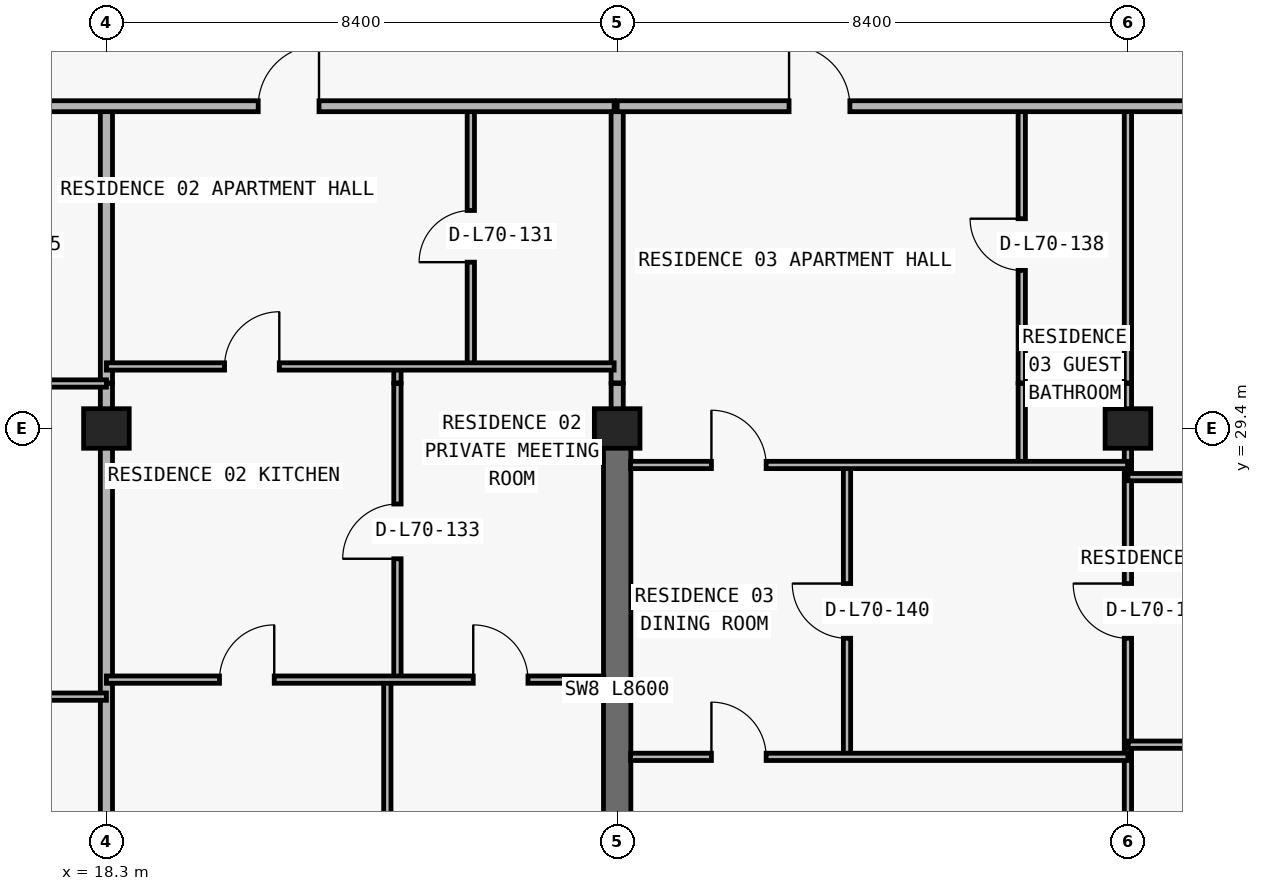
"""IFC4 building model, lengths in metres.
Left out: names, types, materials, properties, quantities, classifications, styles, units other than length and angle.
Written with IfcOpenShell. Run it as: python <this file> out.ifc"""

import sys

from ifc_helpers import new_model, si_unit, direction, frame, frame_2d, origin, origin_2d, place, context, subcontext, project, spatial, rectangle, extrude, element, fill, save


model = new_model("IFC4")
c1 = context("Model", 3, precision=1e-05, world=origin(), true_north=direction((0.0, 1.0)))
c2 = subcontext(c1, "Body", "Model", "MODEL_VIEW")
j1 = project(units=[si_unit("LENGTHUNIT", "METRE"), si_unit("PLANEANGLEUNIT", "RADIAN")], contexts=[c1])
p1 = place(None, origin())
s1 = spatial("IfcSite", under=j1, at=p1, CompositionType="ELEMENT")
p2 = place(p1, origin())
s2 = spatial("IfcBuilding", under=s1, at=p2, CompositionType="ELEMENT")
p3 = place(p2, frame((0.0, 0.0, 249.6)))
s3 = spatial("IfcBuildingStorey", under=s2, at=p3, CompositionType="ELEMENT", Elevation=249.6)
for number, where, z_axis, x_axis in (
    (1, (18.3, 29.4, 0.0), (0.0, 0.0, 1.0), (1.0, 0.0, 0.0)),
    (2, (26.7, 29.4, 0.0), (0.0, 0.0, 1.0), (1.0, 0.0, 0.0)),
    (3, (35.1, 29.4, 0.0), (0.0, 0.0, 1.0), (1.0, 0.0, 0.0)),
):
    element("IfcColumn", number, at=place(p3, frame(where, z_axis=z_axis, x_axis=x_axis)), inside=s3, PredefinedType="COLUMN", context=c2, shape_type="SweptSolid", body=[
        extrude(rectangle(XDim=0.75, YDim=0.65, at=origin_2d()), origin(), (0.0, 0.0, 1.0), 3.05),
    ])
p4 = place(p3, frame((26.7, 20.8, 0.0), z_axis=(0.0, 0.0, 1.0), x_axis=(0.0, 1.0, 0.0)))
e4 = element("IfcWall", 4, at=p4, inside=s3, PredefinedType="SHEAR", context=c2, shape_type="SweptSolid", body=[
    extrude(rectangle(XDim=8.6, YDim=0.45, at=frame_2d((4.3, 0.0))), origin(), (0.0, 0.0, 1.0), 3.05),
])
p5 = place(p3, frame((18.3, 13.34, 0.0), z_axis=(0.0, 0.0, 1.0), x_axis=(0.0, 1.0, 0.0)))
e5 = element("IfcWall", 5, at=p5, inside=s3, PredefinedType="PARTITIONING", context=c2, shape_type="SweptSolid", body=[
    extrude(rectangle(XDim=16.8, YDim=0.2, at=frame_2d((8.4, 0.0))), origin(), (0.0, 0.0, 1.0), 2.263),
])
p6 = place(p3, frame((18.3, 30.15, 0.0), z_axis=(0.0, 0.0, 1.0), x_axis=(0.0, 1.0, 0.0)))
e6 = element("IfcWall", 6, at=p6, inside=s3, PredefinedType="PARTITIONING", context=c2, shape_type="SweptSolid", body=[
    extrude(rectangle(XDim=4.55, YDim=0.2, at=frame_2d((2.275, 0.0))), origin(), (0.0, 0.0, 1.0), 2.263),
])
p7 = place(p3, frame((22.92, 13.34, 0.0), z_axis=(0.0, 0.0, 1.0), x_axis=(0.0, 1.0, 0.0)))
e7 = element("IfcWall", 7, at=p7, inside=s3, PredefinedType="PARTITIONING", context=c2, shape_type="SweptSolid", body=[
    extrude(rectangle(XDim=11.93, YDim=0.12, at=frame_2d((5.965, 0.0))), origin(), (0.0, 0.0, 1.0), 3.05),
])
p8 = place(p3, frame((23.086, 25.275, 0.0), z_axis=(0.0, 0.0, 1.0), x_axis=(0.0, 1.0, 0.0)))
e8 = element("IfcWall", 8, at=p8, inside=s3, PredefinedType="PARTITIONING", context=c2, shape_type="SweptSolid", body=[
    extrude(rectangle(XDim=4.865, YDim=0.12, at=frame_2d((2.433, 0.0))), origin(), (0.0, 0.0, 1.0), 3.05),
])
p9 = place(p8, frame((1.982, 0.0, 0.0)))
e9 = element("IfcOpeningElement", 9, at=p9, cuts=e8, PredefinedType="OPENING", context=c2, shape_type="SweptSolid", body=[
    extrude(rectangle(XDim=0.9, YDim=2.15, at=frame_2d((0.45, 1.075))), frame((0.0, 0.07, 0.0), z_axis=(0.0, -1.0, 0.0), x_axis=(1.0, 0.0, 0.0)), (0.0, 0.0, 1.0), 0.14),
])
p10 = place(p3, frame((23.086, 30.15, 0.0), z_axis=(0.0, 0.0, 1.0), x_axis=(0.0, 1.0, 0.0)))
e10 = element("IfcWall", 10, at=p10, inside=s3, PredefinedType="PARTITIONING", context=c2, shape_type="SweptSolid", body=[
    extrude(rectangle(XDim=0.27, YDim=0.12, at=frame_2d((0.135, 0.0))), origin(), (0.0, 0.0, 1.0), 3.05),
])
p11 = place(p3, frame((24.293, 30.42, 0.0), z_axis=(0.0, 0.0, 1.0), x_axis=(0.0, 1.0, 0.0)))
e11 = element("IfcWall", 11, at=p11, inside=s3, PredefinedType="PARTITIONING", context=c2, shape_type="SweptSolid", body=[
    extrude(rectangle(XDim=4.28, YDim=0.12, at=frame_2d((2.14, 0.0))), origin(), (0.0, 0.0, 1.0), 3.05),
])
p12 = place(p11, frame((1.715, 0.0, 0.0)))
e12 = element("IfcOpeningElement", 12, at=p12, cuts=e11, PredefinedType="OPENING", context=c2, shape_type="SweptSolid", body=[
    extrude(rectangle(XDim=0.85, YDim=2.1, at=frame_2d((0.425, 1.05))), frame((0.0, 0.07, 0.0), z_axis=(0.0, -1.0, 0.0), x_axis=(1.0, 0.0, 0.0)), (0.0, 0.0, 1.0), 0.14),
])
p13 = place(p3, frame((26.7, 29.405, 0.0), z_axis=(0.0, 0.0, 1.0), x_axis=(0.0, 1.0, 0.0)))
e13 = element("IfcWall", 13, at=p13, inside=s3, PredefinedType="PARTITIONING", context=c2, shape_type="SweptSolid", body=[
    extrude(rectangle(XDim=0.735, YDim=0.2, at=frame_2d((0.367, 0.0))), origin(), (0.0, 0.0, 1.0), 2.335),
])
p14 = place(p3, frame((26.7, 30.15, 0.0), z_axis=(0.0, 0.0, 1.0), x_axis=(0.0, 1.0, 0.0)))
e14 = element("IfcWall", 14, at=p14, inside=s3, PredefinedType="PARTITIONING", context=c2, shape_type="SweptSolid", body=[
    extrude(rectangle(XDim=4.55, YDim=0.2, at=frame_2d((2.275, 0.0))), origin(), (0.0, 0.0, 1.0), 2.335),
])
p15 = place(p3, frame((30.48, 24.0, 0.0), z_axis=(0.0, 0.0, 1.0), x_axis=(0.0, 1.0, 0.0)))
e15 = element("IfcWall", 15, at=p15, inside=s3, PredefinedType="PARTITIONING", context=c2, shape_type="SweptSolid", body=[
    extrude(rectangle(XDim=4.8, YDim=0.12, at=frame_2d((2.4, 0.0))), origin(), (0.0, 0.0, 1.0), 3.05),
])
p16 = place(p15, frame((1.95, 0.0, 0.0)))
e16 = element("IfcOpeningElement", 16, at=p16, cuts=e15, PredefinedType="OPENING", context=c2, shape_type="SweptSolid", body=[
    extrude(rectangle(XDim=0.9, YDim=2.15, at=frame_2d((0.45, 1.075))), frame((0.0, 0.07, 0.0), z_axis=(0.0, -1.0, 0.0), x_axis=(1.0, 0.0, 0.0)), (0.0, 0.0, 1.0), 0.14),
])
p17 = place(p3, frame((33.354, 28.8, 0.0), z_axis=(0.0, 0.0, 1.0), x_axis=(0.0, 1.0, 0.0)))
e17 = element("IfcWall", 17, at=p17, inside=s3, PredefinedType="PARTITIONING", context=c2, shape_type="SweptSolid", body=[
    extrude(rectangle(XDim=1.34, YDim=0.12, at=frame_2d((0.67, 0.0))), origin(), (0.0, 0.0, 1.0), 3.05),
])
p18 = place(p3, frame((33.354, 30.15, 0.0), z_axis=(0.0, 0.0, 1.0), x_axis=(0.0, 1.0, 0.0)))
e18 = element("IfcWall", 18, at=p18, inside=s3, PredefinedType="PARTITIONING", context=c2, shape_type="SweptSolid", body=[
    extrude(rectangle(XDim=4.55, YDim=0.12, at=frame_2d((2.275, 0.0))), origin(), (0.0, 0.0, 1.0), 3.05),
])
p19 = place(p18, frame((1.85, 0.0, 0.0)))
e19 = element("IfcOpeningElement", 19, at=p19, cuts=e18, PredefinedType="OPENING", context=c2, shape_type="SweptSolid", body=[
    extrude(rectangle(XDim=0.85, YDim=2.1, at=frame_2d((0.425, 1.05))), frame((0.0, 0.07, 0.0), z_axis=(0.0, -1.0, 0.0), x_axis=(1.0, 0.0, 0.0)), (0.0, 0.0, 1.0), 0.14),
])
p20 = place(p3, frame((35.1, 13.34, 0.0), z_axis=(0.0, 0.0, 1.0), x_axis=(0.0, 1.0, 0.0)))
e20 = element("IfcWall", 20, at=p20, inside=s3, PredefinedType="PARTITIONING", context=c2, shape_type="SweptSolid", body=[
    extrude(rectangle(XDim=16.8, YDim=0.12, at=frame_2d((8.4, 0.0))), origin(), (0.0, 0.0, 1.0), 2.263),
])
p21 = place(p20, frame((12.61, 0.0, 0.0)))
e21 = element("IfcOpeningElement", 21, at=p21, cuts=e20, PredefinedType="OPENING", context=c2, shape_type="SweptSolid", body=[
    extrude(rectangle(XDim=0.9, YDim=2.15, at=frame_2d((0.45, 1.075))), frame((0.0, 0.07, 0.0), z_axis=(0.0, -1.0, 0.0), x_axis=(1.0, 0.0, 0.0)), (0.0, 0.0, 1.0), 0.14),
])
p22 = place(p3, frame((35.1, 30.15, 0.0), z_axis=(0.0, 0.0, 1.0), x_axis=(0.0, 1.0, 0.0)))
e22 = element("IfcWall", 22, at=p22, inside=s3, PredefinedType="PARTITIONING", context=c2, shape_type="SweptSolid", body=[
    extrude(rectangle(XDim=4.55, YDim=0.12, at=frame_2d((2.275, 0.0))), origin(), (0.0, 0.0, 1.0), 2.263),
])
p23 = place(p3, frame((26.92, 24.0, 0.0), z_axis=(0.0, 0.0, 1.0), x_axis=(1.0, 0.0, 0.0)))
e23 = element("IfcWall", 23, at=p23, inside=s3, PredefinedType="PARTITIONING", context=c2, shape_type="SweptSolid", body=[
    extrude(rectangle(XDim=8.18, YDim=0.12, at=frame_2d((4.09, 0.0))), origin(), (0.0, 0.0, 1.0), 3.05),
])
p24 = place(p23, frame((1.33, 0.0, 0.0)))
e24 = element("IfcOpeningElement", 24, at=p24, cuts=e23, PredefinedType="OPENING", context=c2, shape_type="SweptSolid", body=[
    extrude(rectangle(XDim=0.9, YDim=2.15, at=frame_2d((0.45, 1.075))), frame((0.0, 0.07, 0.0), z_axis=(0.0, -1.0, 0.0), x_axis=(1.0, 0.0, 0.0)), (0.0, 0.0, 1.0), 0.14),
])
p25 = place(p3, frame((35.105, 24.2, 0.0), z_axis=(0.0, 0.0, 1.0), x_axis=(1.0, 0.0, 0.0)))
e25 = element("IfcWall", 25, at=p25, inside=s3, PredefinedType="PARTITIONING", context=c2, shape_type="SweptSolid", body=[
    extrude(rectangle(XDim=7.59, YDim=0.12, at=frame_2d((3.795, 0.0))), origin(), (0.0, 0.0, 1.0), 3.05),
])
p26 = place(p25, frame((3.345, 0.0, 0.0)))
e26 = element("IfcOpeningElement", 26, at=p26, cuts=e25, PredefinedType="OPENING", context=c2, shape_type="SweptSolid", body=[
    extrude(rectangle(XDim=0.9, YDim=2.15, at=frame_2d((0.45, 1.075))), frame((0.0, 0.07, 0.0), z_axis=(0.0, -1.0, 0.0), x_axis=(1.0, 0.0, 0.0)), (0.0, 0.0, 1.0), 0.14),
])
p27 = place(p3, frame((12.1, 24.99, 0.0), z_axis=(0.0, 0.0, 1.0), x_axis=(1.0, 0.0, 0.0)))
e27 = element("IfcWall", 27, at=p27, inside=s3, PredefinedType="PARTITIONING", context=c2, shape_type="SweptSolid", body=[
    extrude(rectangle(XDim=6.2, YDim=0.12, at=frame_2d((3.1, 0.0))), origin(), (0.0, 0.0, 1.0), 3.05),
])
p28 = place(p27, frame((1.1, 0.0, 0.0)))
e28 = element("IfcOpeningElement", 28, at=p28, cuts=e27, PredefinedType="OPENING", context=c2, shape_type="SweptSolid", body=[
    extrude(rectangle(XDim=0.9, YDim=2.15, at=frame_2d((0.45, 1.075))), frame((0.0, 0.07, 0.0), z_axis=(0.0, -1.0, 0.0), x_axis=(1.0, 0.0, 0.0)), (0.0, 0.0, 1.0), 0.14),
])
p29 = place(p27, frame((4.324, 0.0, 0.0)))
e29 = element("IfcOpeningElement", 29, at=p29, cuts=e27, PredefinedType="OPENING", context=c2, shape_type="SweptSolid", body=[
    extrude(rectangle(XDim=0.9, YDim=2.15, at=frame_2d((0.45, 1.075))), frame((0.0, 0.07, 0.0), z_axis=(0.0, -1.0, 0.0), x_axis=(1.0, 0.0, 0.0)), (0.0, 0.0, 1.0), 0.14),
])
p30 = place(p3, frame((18.3, 25.27, 0.0), z_axis=(0.0, 0.0, 1.0), x_axis=(1.0, 0.0, 0.0)))
e30 = element("IfcWall", 30, at=p30, inside=s3, PredefinedType="PARTITIONING", context=c2, shape_type="SweptSolid", body=[
    extrude(rectangle(XDim=8.18, YDim=0.12, at=frame_2d((4.09, 0.0))), origin(), (0.0, 0.0, 1.0), 3.05),
])
p31 = place(p30, frame((1.86, 0.0, 0.0)))
e31 = element("IfcOpeningElement", 31, at=p31, cuts=e30, PredefinedType="OPENING", context=c2, shape_type="SweptSolid", body=[
    extrude(rectangle(XDim=0.9, YDim=2.15, at=frame_2d((0.45, 1.075))), frame((0.0, 0.07, 0.0), z_axis=(0.0, -1.0, 0.0), x_axis=(1.0, 0.0, 0.0)), (0.0, 0.0, 1.0), 0.14),
])
p32 = place(p30, frame((6.033, 0.0, 0.0)))
e32 = element("IfcOpeningElement", 32, at=p32, cuts=e30, PredefinedType="OPENING", context=c2, shape_type="SweptSolid", body=[
    extrude(rectangle(XDim=0.9, YDim=2.15, at=frame_2d((0.45, 1.075))), frame((0.0, 0.07, 0.0), z_axis=(0.0, -1.0, 0.0), x_axis=(1.0, 0.0, 0.0)), (0.0, 0.0, 1.0), 0.14),
])
p33 = place(p3, frame((35.1, 28.6, 0.0), z_axis=(0.0, 0.0, 1.0), x_axis=(1.0, 0.0, 0.0)))
e33 = element("IfcWall", 33, at=p33, inside=s3, PredefinedType="PARTITIONING", context=c2, shape_type="SweptSolid", body=[
    extrude(rectangle(XDim=7.6, YDim=0.12, at=frame_2d((3.8, 0.0))), origin(), (0.0, 0.0, 1.0), 3.05),
])
p34 = place(p33, frame((2.563, 0.0, 0.0)))
e34 = element("IfcOpeningElement", 34, at=p34, cuts=e33, PredefinedType="OPENING", context=c2, shape_type="SweptSolid", body=[
    extrude(rectangle(XDim=0.9, YDim=2.15, at=frame_2d((0.45, 1.075))), frame((0.0, 0.07, 0.0), z_axis=(0.0, -1.0, 0.0), x_axis=(1.0, 0.0, 0.0)), (0.0, 0.0, 1.0), 0.14),
])
p35 = place(p3, frame((26.92, 28.8, 0.0), z_axis=(0.0, 0.0, 1.0), x_axis=(1.0, 0.0, 0.0)))
e35 = element("IfcWall", 35, at=p35, inside=s3, PredefinedType="PARTITIONING", context=c2, shape_type="SweptSolid", body=[
    extrude(rectangle(XDim=8.175, YDim=0.12, at=frame_2d((4.087, 0.0))), origin(), (0.0, 0.0, 1.0), 3.05),
])
p36 = place(p35, frame((1.33, 0.0, 0.0)))
e36 = element("IfcOpeningElement", 36, at=p36, cuts=e35, PredefinedType="OPENING", context=c2, shape_type="SweptSolid", body=[
    extrude(rectangle(XDim=0.9, YDim=2.15, at=frame_2d((0.45, 1.075))), frame((0.0, 0.07, 0.0), z_axis=(0.0, -1.0, 0.0), x_axis=(1.0, 0.0, 0.0)), (0.0, 0.0, 1.0), 0.14),
])
p37 = place(p3, frame((12.1, 30.14, 0.0), z_axis=(0.0, 0.0, 1.0), x_axis=(1.0, 0.0, 0.0)))
e37 = element("IfcWall", 37, at=p37, inside=s3, PredefinedType="PARTITIONING", context=c2, shape_type="SweptSolid", body=[
    extrude(rectangle(XDim=6.2, YDim=0.12, at=frame_2d((3.1, 0.0))), origin(), (0.0, 0.0, 1.0), 3.05),
])
p38 = place(p37, frame((1.224, 0.0, 0.0)))
e38 = element("IfcOpeningElement", 38, at=p38, cuts=e37, PredefinedType="OPENING", context=c2, shape_type="SweptSolid", body=[
    extrude(rectangle(XDim=0.9, YDim=2.15, at=frame_2d((0.45, 1.075))), frame((0.0, 0.07, 0.0), z_axis=(0.0, -1.0, 0.0), x_axis=(1.0, 0.0, 0.0)), (0.0, 0.0, 1.0), 0.14),
])
p39 = place(p3, frame((18.3, 30.42, 0.0), z_axis=(0.0, 0.0, 1.0), x_axis=(1.0, 0.0, 0.0)))
e39 = element("IfcWall", 39, at=p39, inside=s3, PredefinedType="PARTITIONING", context=c2, shape_type="SweptSolid", body=[
    extrude(rectangle(XDim=8.35, YDim=0.12, at=frame_2d((4.175, 0.0))), origin(), (0.0, 0.0, 1.0), 3.05),
])
p40 = place(p39, frame((1.943, 0.0, 0.0)))
e40 = element("IfcOpeningElement", 40, at=p40, cuts=e39, PredefinedType="OPENING", context=c2, shape_type="SweptSolid", body=[
    extrude(rectangle(XDim=0.9, YDim=2.15, at=frame_2d((0.45, 1.075))), frame((0.0, 0.07, 0.0), z_axis=(0.0, -1.0, 0.0), x_axis=(1.0, 0.0, 0.0)), (0.0, 0.0, 1.0), 0.14),
])
p41 = place(p3, frame((12.105, 34.7, 0.0), z_axis=(0.0, 0.0, 1.0), x_axis=(1.0, 0.0, 0.0)))
e41 = element("IfcWall", 41, at=p41, inside=s3, PredefinedType="PARTITIONING", context=c2, shape_type="SweptSolid", body=[
    extrude(rectangle(XDim=14.545, YDim=0.18, at=frame_2d((7.272, 0.0))), origin(), (0.0, 0.0, 1.0), 3.05),
])
p42 = place(p41, frame((1.545, 0.0, 0.0)))
e42 = element("IfcOpeningElement", 42, at=p42, cuts=e41, PredefinedType="OPENING", context=c2, shape_type="SweptSolid", body=[
    extrude(rectangle(XDim=1.0, YDim=2.2, at=frame_2d((0.5, 1.1))), frame((0.0, 0.1, 0.0), z_axis=(0.0, -1.0, 0.0), x_axis=(1.0, 0.0, 0.0)), (0.0, 0.0, 1.0), 0.2),
])
p43 = place(p41, frame((8.691, 0.0, 0.0)))
e43 = element("IfcOpeningElement", 43, at=p43, cuts=e41, PredefinedType="OPENING", context=c2, shape_type="SweptSolid", body=[
    extrude(rectangle(XDim=1.0, YDim=2.2, at=frame_2d((0.5, 1.1))), frame((0.0, 0.1, 0.0), z_axis=(0.0, -1.0, 0.0), x_axis=(1.0, 0.0, 0.0)), (0.0, 0.0, 1.0), 0.2),
])
p44 = place(p3, frame((26.7, 34.7, 0.0), z_axis=(0.0, 0.0, 1.0), x_axis=(1.0, 0.0, 0.0)))
e44 = element("IfcWall", 44, at=p44, inside=s3, PredefinedType="PARTITIONING", context=c2, shape_type="SweptSolid", body=[
    extrude(rectangle(XDim=39.0, YDim=0.18, at=frame_2d((19.5, 0.0))), origin(), (0.0, 0.0, 1.0), 3.05),
])
p45 = place(p44, frame((2.827, 0.0, 0.0)))
e45 = element("IfcOpeningElement", 45, at=p45, cuts=e44, PredefinedType="OPENING", context=c2, shape_type="SweptSolid", body=[
    extrude(rectangle(XDim=1.0, YDim=2.2, at=frame_2d((0.5, 1.1))), frame((0.0, 0.1, 0.0), z_axis=(0.0, -1.0, 0.0), x_axis=(1.0, 0.0, 0.0)), (0.0, 0.0, 1.0), 0.2),
])
p46 = place(p44, frame((27.27, 0.0, 0.0)))
e46 = element("IfcOpeningElement", 46, at=p46, cuts=e44, PredefinedType="OPENING", context=c2, shape_type="SweptSolid", body=[
    extrude(rectangle(XDim=1.0, YDim=2.2, at=frame_2d((0.5, 1.1))), frame((0.0, 0.1, 0.0), z_axis=(0.0, -1.0, 0.0), x_axis=(1.0, 0.0, 0.0)), (0.0, 0.0, 1.0), 0.2),
])
p47 = place(p43, origin())
e47 = element("IfcDoor", 47, at=p47, inside=s3, OperationType="SINGLE_SWING_RIGHT", PredefinedType="DOOR", context=c2, shape_type="SweptSolid", body=[
    extrude(rectangle(XDim=1.0, YDim=2.2, at=frame_2d((0.5, 1.1))), frame((0.0, 0.025, 0.0), z_axis=(0.0, -1.0, 0.0), x_axis=(1.0, 0.0, 0.0)), (0.0, 0.0, 1.0), 0.05),
])
fill(e43, e47)
p48 = place(p12, origin())
e48 = element("IfcDoor", 48, at=p48, inside=s3, OperationType="SINGLE_SWING_LEFT", PredefinedType="DOOR", context=c2, shape_type="SweptSolid", body=[
    extrude(rectangle(XDim=0.85, YDim=2.1, at=frame_2d((0.425, 1.05))), frame((0.0, 0.025, 0.0), z_axis=(0.0, -1.0, 0.0), x_axis=(1.0, 0.0, 0.0)), (0.0, 0.0, 1.0), 0.05),
])
fill(e12, e48)
p49 = place(p40, origin())
e49 = element("IfcDoor", 49, at=p49, inside=s3, OperationType="SINGLE_SWING_RIGHT", PredefinedType="DOOR", context=c2, shape_type="SweptSolid", body=[
    extrude(rectangle(XDim=0.9, YDim=2.15, at=frame_2d((0.45, 1.075))), frame((0.0, 0.025, 0.0), z_axis=(0.0, -1.0, 0.0), x_axis=(1.0, 0.0, 0.0)), (0.0, 0.0, 1.0), 0.05),
])
fill(e40, e49)
p50 = place(p9, origin())
e50 = element("IfcDoor", 50, at=p50, inside=s3, OperationType="SINGLE_SWING_LEFT", PredefinedType="DOOR", context=c2, shape_type="SweptSolid", body=[
    extrude(rectangle(XDim=0.9, YDim=2.15, at=frame_2d((0.45, 1.075))), frame((0.0, 0.025, 0.0), z_axis=(0.0, -1.0, 0.0), x_axis=(1.0, 0.0, 0.0)), (0.0, 0.0, 1.0), 0.05),
])
fill(e9, e50)
p51 = place(p31, origin())
e51 = element("IfcDoor", 51, at=p51, inside=s3, OperationType="SINGLE_SWING_RIGHT", PredefinedType="DOOR", context=c2, shape_type="SweptSolid", body=[
    extrude(rectangle(XDim=0.9, YDim=2.15, at=frame_2d((0.45, 1.075))), frame((0.0, 0.025, 0.0), z_axis=(0.0, -1.0, 0.0), x_axis=(1.0, 0.0, 0.0)), (0.0, 0.0, 1.0), 0.05),
])
fill(e31, e51)
p52 = place(p32, origin())
e52 = element("IfcDoor", 52, at=p52, inside=s3, OperationType="SINGLE_SWING_LEFT", PredefinedType="DOOR", context=c2, shape_type="SweptSolid", body=[
    extrude(rectangle(XDim=0.9, YDim=2.15, at=frame_2d((0.45, 1.075))), frame((0.0, 0.025, 0.0), z_axis=(0.0, -1.0, 0.0), x_axis=(1.0, 0.0, 0.0)), (0.0, 0.0, 1.0), 0.05),
])
fill(e32, e52)
p53 = place(p45, origin())
e53 = element("IfcDoor", 53, at=p53, inside=s3, OperationType="SINGLE_SWING_LEFT", PredefinedType="DOOR", context=c2, shape_type="SweptSolid", body=[
    extrude(rectangle(XDim=1.0, YDim=2.2, at=frame_2d((0.5, 1.1))), frame((0.0, 0.025, 0.0), z_axis=(0.0, -1.0, 0.0), x_axis=(1.0, 0.0, 0.0)), (0.0, 0.0, 1.0), 0.05),
])
fill(e45, e53)
p54 = place(p19, origin())
e54 = element("IfcDoor", 54, at=p54, inside=s3, OperationType="SINGLE_SWING_RIGHT", PredefinedType="DOOR", context=c2, shape_type="SweptSolid", body=[
    extrude(rectangle(XDim=0.85, YDim=2.1, at=frame_2d((0.425, 1.05))), frame((0.0, 0.025, 0.0), z_axis=(0.0, -1.0, 0.0), x_axis=(1.0, 0.0, 0.0)), (0.0, 0.0, 1.0), 0.05),
])
fill(e19, e54)
p55 = place(p36, origin())
e55 = element("IfcDoor", 55, at=p55, inside=s3, OperationType="SINGLE_SWING_LEFT", PredefinedType="DOOR", context=c2, shape_type="SweptSolid", body=[
    extrude(rectangle(XDim=0.9, YDim=2.15, at=frame_2d((0.45, 1.075))), frame((0.0, 0.025, 0.0), z_axis=(0.0, -1.0, 0.0), x_axis=(1.0, 0.0, 0.0)), (0.0, 0.0, 1.0), 0.05),
])
fill(e36, e55)
p56 = place(p16, origin())
e56 = element("IfcDoor", 56, at=p56, inside=s3, OperationType="SINGLE_SWING_RIGHT", PredefinedType="DOOR", context=c2, shape_type="SweptSolid", body=[
    extrude(rectangle(XDim=0.9, YDim=2.15, at=frame_2d((0.45, 1.075))), frame((0.0, 0.025, 0.0), z_axis=(0.0, -1.0, 0.0), x_axis=(1.0, 0.0, 0.0)), (0.0, 0.0, 1.0), 0.05),
])
fill(e16, e56)
p57 = place(p24, origin())
e57 = element("IfcDoor", 57, at=p57, inside=s3, OperationType="SINGLE_SWING_LEFT", PredefinedType="DOOR", context=c2, shape_type="SweptSolid", body=[
    extrude(rectangle(XDim=0.9, YDim=2.15, at=frame_2d((0.45, 1.075))), frame((0.0, 0.025, 0.0), z_axis=(0.0, -1.0, 0.0), x_axis=(1.0, 0.0, 0.0)), (0.0, 0.0, 1.0), 0.05),
])
fill(e24, e57)
p58 = place(p21, origin())
e58 = element("IfcDoor", 58, at=p58, inside=s3, OperationType="SINGLE_SWING_RIGHT", PredefinedType="DOOR", context=c2, shape_type="SweptSolid", body=[
    extrude(rectangle(XDim=0.9, YDim=2.15, at=frame_2d((0.45, 1.075))), frame((0.0, 0.025, 0.0), z_axis=(0.0, -1.0, 0.0), x_axis=(1.0, 0.0, 0.0)), (0.0, 0.0, 1.0), 0.05),
])
fill(e21, e58)
save(model, sys.argv[1])
